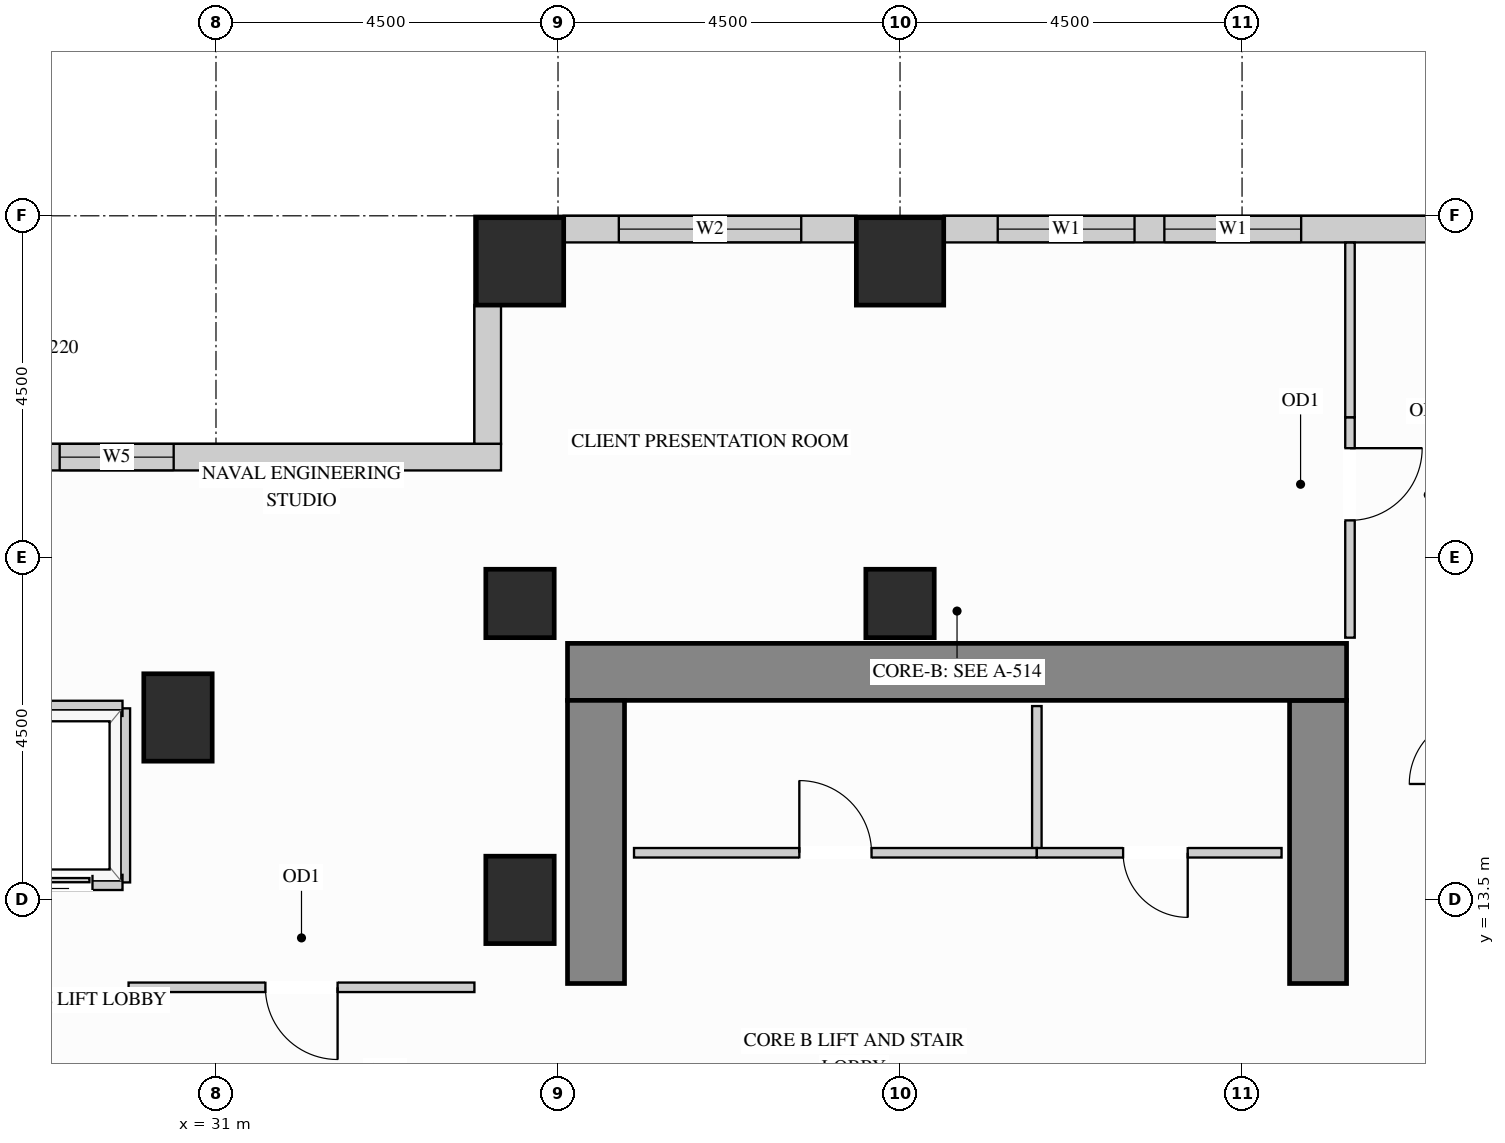
"""IFC4 building model, lengths in metres.
Left out: names, types, materials, properties, quantities, classifications, styles, units other than length and angle.
Written with IfcOpenShell. Run it as: python <this file> out.ifc"""

import sys

from ifc_helpers import new_model, si_unit, direction, frame, frame_2d, origin, origin_2d, place, context, subcontext, project, spatial, rectangle, extrude, source, transform, mapped, element, fill, save


model = new_model("IFC4")
c1 = context("Model", 3, precision=1e-05, world=origin(), true_north=direction((0.0, 1.0)))
c2 = subcontext(c1, "Body", "Model", "MODEL_VIEW")
j1 = project(units=[si_unit("LENGTHUNIT", "METRE"), si_unit("PLANEANGLEUNIT", "RADIAN")], contexts=[c1])
p1 = place(None, origin())
s1 = spatial("IfcSite", under=j1, at=p1, CompositionType="ELEMENT")
p2 = place(p1, origin())
s2 = spatial("IfcBuilding", under=s1, at=p2, CompositionType="ELEMENT")
p3 = place(p2, frame((0.0, 0.0, 109.8)))
s3 = spatial("IfcBuildingStorey", under=s2, at=p3, CompositionType="ELEMENT", Elevation=109.8)
m1 = source(origin(), c2, "Body", "SweptSolid", [
    extrude(rectangle(XDim=0.9, YDim=0.9, at=origin_2d()), origin(), (0.0, 0.0, 1.0), 3.38),
])
for number, where, z_axis, x_axis in (
    (1, (35.0, 17.4, 0.0), (0.0, 0.0, 1.0), (1.0, 0.0, 0.0)),
    (2, (40.0, 17.4, 0.0), (0.0, 0.0, 1.0), (1.0, 0.0, 0.0)),
):
    element("IfcColumn", number, at=place(p3, frame(where, z_axis=z_axis, x_axis=x_axis)), inside=s3, PredefinedType="COLUMN", context=c2, shape_type="MappedRepresentation", body=[
        mapped(m1, transform((0.0, 0.0, 0.0), x_axis=(1.0, 0.0, 0.0), y_axis=(0.0, 1.0, 0.0), z_axis=(0.0, 0.0, 1.0))),
    ])
m2 = source(origin(), c2, "Body", "SweptSolid", [
    extrude(rectangle(XDim=0.9, YDim=1.15, at=origin_2d()), origin(), (0.0, 0.0, 1.0), 3.38),
])
for number, where, z_axis, x_axis in (
    (3, (35.0, 13.5, 0.0), (0.0, 0.0, 1.0), (1.0, 0.0, 0.0)),
    (4, (30.5, 15.9, 0.0), (0.0, 0.0, 1.0), (1.0, 0.0, 0.0)),
):
    element("IfcColumn", number, at=place(p3, frame(where, z_axis=z_axis, x_axis=x_axis)), inside=s3, PredefinedType="COLUMN", context=c2, shape_type="MappedRepresentation", body=[
        mapped(m2, transform((0.0, 0.0, 0.0), x_axis=(1.0, 0.0, 0.0), y_axis=(0.0, 1.0, 0.0), z_axis=(0.0, 0.0, 1.0))),
    ])
m3 = source(origin(), c2, "Body", "SweptSolid", [
    extrude(rectangle(XDim=1.15, YDim=1.15, at=origin_2d()), origin(), (0.0, 0.0, 1.0), 3.38),
])
for number, where, z_axis, x_axis in (
    (5, (35.0, 21.9, 0.0), (0.0, 0.0, 1.0), (1.0, 0.0, 0.0)),
    (6, (40.0, 21.9, 0.0), (0.0, 0.0, 1.0), (1.0, 0.0, 0.0)),
):
    element("IfcColumn", number, at=place(p3, frame(where, z_axis=z_axis, x_axis=x_axis)), inside=s3, PredefinedType="COLUMN", context=c2, shape_type="MappedRepresentation", body=[
        mapped(m3, transform((0.0, 0.0, 0.0), x_axis=(1.0, 0.0, 0.0), y_axis=(0.0, 1.0, 0.0), z_axis=(0.0, 0.0, 1.0))),
    ])
m4 = source(origin(), c2, "Body", "SweptSolid", [
    extrude(rectangle(XDim=3.725, YDim=0.75, at=frame_2d((1.863, 0.0))), origin(), (0.0, 0.0, 1.0), 3.38),
])
p4 = place(p3, frame((45.5, 12.4, 0.0), z_axis=(0.0, 0.0, 1.0), x_axis=(0.0, 1.0, 0.0)))
e7 = element("IfcWall", 7, at=p4, inside=s3, PredefinedType="SHEAR", context=c2, shape_type="MappedRepresentation", body=[
    mapped(m4, transform((0.0, 0.0, 0.0), x_axis=(1.0, 0.0, 0.0), y_axis=(0.0, 1.0, 0.0), z_axis=(0.0, 0.0, 1.0))),
])
m5 = source(origin(), c2, "Body", "SweptSolid", [
    extrude(rectangle(XDim=10.25, YDim=0.75, at=frame_2d((5.125, 0.0))), origin(), (0.0, 0.0, 1.0), 3.38),
])
p5 = place(p3, frame((35.625, 16.5, 0.0), z_axis=(0.0, 0.0, 1.0), x_axis=(1.0, 0.0, 0.0)))
e8 = element("IfcWall", 8, at=p5, inside=s3, PredefinedType="SHEAR", context=c2, shape_type="MappedRepresentation", body=[
    mapped(m5, transform((0.0, 0.0, 0.0), x_axis=(1.0, 0.0, 0.0), y_axis=(0.0, 1.0, 0.0), z_axis=(0.0, 0.0, 1.0))),
])
p6 = place(p3, frame((36.0, 12.4, 0.0), z_axis=(0.0, 0.0, 1.0), x_axis=(0.0, 1.0, 0.0)))
e9 = element("IfcWall", 9, at=p6, inside=s3, PredefinedType="SHEAR", context=c2, shape_type="MappedRepresentation", body=[
    mapped(m4, transform((0.0, 0.0, 0.0), x_axis=(1.0, 0.0, 0.0), y_axis=(0.0, 1.0, 0.0), z_axis=(0.0, 0.0, 1.0))),
])
p7 = place(p3, frame((47.027, 22.325, 0.0), z_axis=(0.0, 0.0, 1.0), x_axis=(-1.0, 0.0, 0.0)))
e10 = element("IfcWall", 10, at=p7, inside=s3, PredefinedType="SOLIDWALL", context=c2, shape_type="SweptSolid", body=[
    extrude(rectangle(XDim=6.454, YDim=0.35, at=frame_2d((3.227, 0.0))), origin(), (0.0, 0.0, 1.0), 3.365),
])
p8 = place(p7, frame((1.749, 0.0, 0.78)))
e11 = element("IfcOpeningElement", 11, at=p8, cuts=e10, PredefinedType="OPENING", context=c2, shape_type="SweptSolid", body=[
    extrude(rectangle(XDim=1.8, YDim=2.1, at=frame_2d((0.9, 1.05))), frame((0.0, 0.185, 0.0), z_axis=(0.0, -1.0, 0.0), x_axis=(1.0, 0.0, 0.0)), (0.0, 0.0, 1.0), 0.37),
])
p9 = place(p7, frame((3.942, 0.0, 0.78)))
e12 = element("IfcOpeningElement", 12, at=p9, cuts=e10, PredefinedType="OPENING", context=c2, shape_type="SweptSolid", body=[
    extrude(rectangle(XDim=1.8, YDim=2.1, at=frame_2d((0.9, 1.05))), frame((0.0, 0.185, 0.0), z_axis=(0.0, -1.0, 0.0), x_axis=(1.0, 0.0, 0.0)), (0.0, 0.0, 1.0), 0.37),
])
p10 = place(p3, frame((39.427, 22.325, 0.0), z_axis=(0.0, 0.0, 1.0), x_axis=(-1.0, 0.0, 0.0)))
e13 = element("IfcWall", 13, at=p10, inside=s3, PredefinedType="SOLIDWALL", context=c2, shape_type="SweptSolid", body=[
    extrude(rectangle(XDim=3.854, YDim=0.35, at=frame_2d((1.927, 0.0))), origin(), (0.0, 0.0, 1.0), 3.365),
])
p11 = place(p10, frame((0.727, 0.0, 0.78)))
e14 = element("IfcOpeningElement", 14, at=p11, cuts=e13, PredefinedType="OPENING", context=c2, shape_type="SweptSolid", body=[
    extrude(rectangle(XDim=2.4, YDim=2.1, at=frame_2d((1.2, 1.05))), frame((0.0, 0.185, 0.0), z_axis=(0.0, -1.0, 0.0), x_axis=(1.0, 0.0, 0.0)), (0.0, 0.0, 1.0), 0.37),
])
m6 = source(origin(), c2, "Body", "SweptSolid", [
    extrude(rectangle(XDim=1.829, YDim=0.35, at=frame_2d((0.915, 0.0))), origin(), (0.0, 0.0, 1.0), 3.365),
])
p12 = place(p3, frame((34.575, 21.327, 0.0), z_axis=(0.0, 0.0, 1.0), x_axis=(0.0, -1.0, 0.0)))
e15 = element("IfcWall", 15, at=p12, inside=s3, PredefinedType="SOLIDWALL", context=c2, shape_type="MappedRepresentation", body=[
    mapped(m6, transform((0.0, 0.0, 0.0), x_axis=(1.0, 0.0, 0.0), y_axis=(0.0, 1.0, 0.0), z_axis=(0.0, 0.0, 1.0))),
])
p13 = place(p3, frame((34.75, 19.325, 0.0), z_axis=(0.0, 0.0, 1.0), x_axis=(-1.0, 0.0, 0.0)))
e16 = element("IfcWall", 16, at=p13, inside=s3, PredefinedType="SOLIDWALL", context=c2, shape_type="SweptSolid", body=[
    extrude(rectangle(XDim=15.6, YDim=0.35, at=frame_2d((7.8, 0.0))), origin(), (0.0, 0.0, 1.0), 3.365),
])
p14 = place(p13, frame((4.307, 0.0, 0.78)))
e17 = element("IfcOpeningElement", 17, at=p14, cuts=e16, PredefinedType="OPENING", context=c2, shape_type="SweptSolid", body=[
    extrude(rectangle(XDim=1.5, YDim=2.0, at=frame_2d((0.75, 1.0))), frame((0.0, 0.185, 0.0), z_axis=(0.0, -1.0, 0.0), x_axis=(1.0, 0.0, 0.0)), (0.0, 0.0, 1.0), 0.37),
])
p15 = place(p13, frame((9.793, 0.0, 0.78)))
e18 = element("IfcOpeningElement", 18, at=p15, cuts=e16, PredefinedType="OPENING", context=c2, shape_type="SweptSolid", body=[
    extrude(rectangle(XDim=1.5, YDim=2.0, at=frame_2d((0.75, 1.0))), frame((0.0, 0.185, 0.0), z_axis=(0.0, -1.0, 0.0), x_axis=(1.0, 0.0, 0.0)), (0.0, 0.0, 1.0), 0.37),
])
m7 = source(origin(), c2, "Body", "SweptSolid", [
    extrude(rectangle(XDim=1.93, YDim=0.125, at=frame_2d((0.965, 0.0))), origin(), (0.0, 0.0, 1.0), 3.365),
])
p16 = place(p3, frame((41.8, 14.12, 0.0), z_axis=(0.0, 0.0, 1.0), x_axis=(0.0, 1.0, 0.0)))
e19 = element("IfcWall", 19, at=p16, inside=s3, PredefinedType="PARTITIONING", context=c2, shape_type="MappedRepresentation", body=[
    mapped(m7, transform((0.0, 0.0, 0.0), x_axis=(1.0, 0.0, 0.0), y_axis=(0.0, 1.0, 0.0), z_axis=(0.0, 0.0, 1.0))),
])
p17 = place(p3, frame((36.5, 14.12, 0.0), z_axis=(0.0, 0.0, 1.0), x_axis=(1.0, 0.0, 0.0)))
e20 = element("IfcWall", 20, at=p17, inside=s3, PredefinedType="PARTITIONING", context=c2, shape_type="SweptSolid", body=[
    extrude(rectangle(XDim=5.3, YDim=0.125, at=frame_2d((2.65, 0.0))), origin(), (0.0, 0.0, 1.0), 3.365),
])
p18 = place(p17, frame((2.175, 0.0, 0.0)))
e21 = element("IfcOpeningElement", 21, at=p18, cuts=e20, PredefinedType="OPENING", context=c2, shape_type="SweptSolid", body=[
    extrude(rectangle(XDim=0.95, YDim=2.15, at=frame_2d((0.475, 1.075))), frame((0.0, 0.073, 0.0), z_axis=(0.0, -1.0, 0.0), x_axis=(1.0, 0.0, 0.0)), (0.0, 0.0, 1.0), 0.145),
])
p19 = place(p3, frame((41.8, 14.12, 0.0), z_axis=(0.0, 0.0, 1.0), x_axis=(1.0, 0.0, 0.0)))
e22 = element("IfcWall", 22, at=p19, inside=s3, PredefinedType="PARTITIONING", context=c2, shape_type="SweptSolid", body=[
    extrude(rectangle(XDim=3.22, YDim=0.125, at=frame_2d((1.61, 0.0))), origin(), (0.0, 0.0, 1.0), 3.365),
])
p20 = place(p19, frame((1.135, 0.0, 0.0)))
e23 = element("IfcOpeningElement", 23, at=p20, cuts=e22, PredefinedType="OPENING", context=c2, shape_type="SweptSolid", body=[
    extrude(rectangle(XDim=0.85, YDim=2.1, at=frame_2d((0.425, 1.05))), frame((0.0, 0.073, 0.0), z_axis=(0.0, -1.0, 0.0), x_axis=(1.0, 0.0, 0.0)), (0.0, 0.0, 1.0), 0.145),
])
p21 = place(p3, frame((45.92, 16.95, 0.0), z_axis=(0.0, 0.0, 1.0), x_axis=(0.0, 1.0, 0.0)))
e24 = element("IfcWall", 24, at=p21, inside=s3, PredefinedType="PARTITIONING", context=c2, shape_type="SweptSolid", body=[
    extrude(rectangle(XDim=2.9, YDim=0.125, at=frame_2d((1.45, 0.0))), origin(), (0.0, 0.0, 1.0), 3.365),
])
p22 = place(p21, frame((1.543, 0.0, 0.0)))
e25 = element("IfcOpeningElement", 25, at=p22, cuts=e24, PredefinedType="OPENING", context=c2, shape_type="SweptSolid", body=[
    extrude(rectangle(XDim=0.95, YDim=2.15, at=frame_2d((0.475, 1.075))), frame((0.0, 0.073, 0.0), z_axis=(0.0, -1.0, 0.0), x_axis=(1.0, 0.0, 0.0)), (0.0, 0.0, 1.0), 0.145),
])
m8 = source(origin(), c2, "Body", "SweptSolid", [
    extrude(rectangle(XDim=2.298, YDim=0.125, at=frame_2d((1.149, 0.0))), origin(), (0.0, 0.0, 1.0), 3.365),
])
p23 = place(p3, frame((45.92, 19.85, 0.0), z_axis=(0.0, 0.0, 1.0), x_axis=(0.0, 1.0, 0.0)))
e26 = element("IfcWall", 26, at=p23, inside=s3, PredefinedType="PARTITIONING", context=c2, shape_type="MappedRepresentation", body=[
    mapped(m8, transform((0.0, 0.0, 0.0), x_axis=(1.0, 0.0, 0.0), y_axis=(0.0, 1.0, 0.0), z_axis=(0.0, 0.0, 1.0))),
])
p24 = place(p3, frame((29.85, 12.35, 0.0), z_axis=(0.0, 0.0, 1.0), x_axis=(1.0, 0.0, 0.0)))
e27 = element("IfcWall", 27, at=p24, inside=s3, PredefinedType="PARTITIONING", context=c2, shape_type="SweptSolid", body=[
    extrude(rectangle(XDim=4.55, YDim=0.125, at=frame_2d((2.275, 0.0))), origin(), (0.0, 0.0, 1.0), 3.365),
])
p25 = place(p24, frame((1.8, 0.0, 0.0)))
e28 = element("IfcOpeningElement", 28, at=p25, cuts=e27, PredefinedType="OPENING", context=c2, shape_type="SweptSolid", body=[
    extrude(rectangle(XDim=0.95, YDim=2.15, at=frame_2d((0.475, 1.075))), frame((0.0, 0.073, 0.0), z_axis=(0.0, -1.0, 0.0), x_axis=(1.0, 0.0, 0.0)), (0.0, 0.0, 1.0), 0.145),
])
m9 = source(origin(), c2, "Body", "SweptSolid", [
    extrude(rectangle(XDim=2.29, YDim=0.2, at=frame_2d((1.145, 0.0))), origin(), (0.0, 0.0, 1.0), 3.365),
])
p26 = place(p3, frame((29.77, 13.73, 0.0), z_axis=(0.0, 0.0, 1.0), x_axis=(0.0, 1.0, 0.0)))
e29 = element("IfcWall", 29, at=p26, inside=s3, PredefinedType="PARTITIONING", context=c2, shape_type="MappedRepresentation", body=[
    mapped(m9, transform((0.0, 0.0, 0.0), x_axis=(1.0, 0.0, 0.0), y_axis=(0.0, 1.0, 0.0), z_axis=(0.0, 0.0, 1.0))),
])
m10 = source(origin(), c2, "Body", "SweptSolid", [
    extrude(rectangle(XDim=1.89, YDim=0.2, at=frame_2d((0.945, 0.0))), origin(), (0.0, 0.0, 1.0), 2.677),
])
p27 = place(p3, frame((27.88, 16.02, 0.0), z_axis=(0.0, 0.0, 1.0), x_axis=(1.0, 0.0, 0.0)))
e30 = element("IfcWall", 30, at=p27, inside=s3, PredefinedType="PARTITIONING", context=c2, shape_type="MappedRepresentation", body=[
    mapped(m10, transform((0.0, 0.0, 0.0), x_axis=(1.0, 0.0, 0.0), y_axis=(0.0, 1.0, 0.0), z_axis=(0.0, 0.0, 1.0))),
])
p28 = place(p3, frame((27.88, 13.73, 0.0), z_axis=(0.0, 0.0, 1.0), x_axis=(1.0, 0.0, 0.0)))
e31 = element("IfcWall", 31, at=p28, inside=s3, PredefinedType="PARTITIONING", context=c2, shape_type="SweptSolid", body=[
    extrude(rectangle(XDim=1.89, YDim=0.2, at=frame_2d((0.945, 0.0))), origin(), (0.0, 0.0, 1.0), 2.446),
])
p29 = place(p28, frame((0.395, 0.0, 0.0)))
e32 = element("IfcOpeningElement", 32, at=p29, cuts=e31, PredefinedType="OPENING", context=c2, shape_type="SweptSolid", body=[
    extrude(rectangle(XDim=1.1, YDim=2.2, at=frame_2d((0.55, 1.1))), frame((0.0, 0.11, 0.0), z_axis=(0.0, -1.0, 0.0), x_axis=(1.0, 0.0, 0.0)), (0.0, 0.0, 1.0), 0.22),
])
m11 = source(origin(), c2, "Body", "SweptSolid", [
    extrude(rectangle(XDim=1.1, YDim=2.2, at=frame_2d((0.55, 1.1))), frame((0.0, 0.025, 0.0), z_axis=(0.0, -1.0, 0.0), x_axis=(1.0, 0.0, 0.0)), (0.0, 0.0, 1.0), 0.05),
])
p30 = place(p29, origin())
e33 = element("IfcDoor", 33, at=p30, inside=s3, OperationType="SLIDING_TO_LEFT", PredefinedType="DOOR", context=c2, shape_type="MappedRepresentation", body=[
    mapped(m11, transform((0.0, 0.0, 0.0), x_axis=(1.0, 0.0, 0.0), y_axis=(0.0, 1.0, 0.0), z_axis=(0.0, 0.0, 1.0))),
])
fill(e32, e33)
m12 = source(origin(), c2, "Body", "SweptSolid", [
    extrude(rectangle(XDim=0.95, YDim=2.15, at=frame_2d((0.475, 1.075))), frame((0.0, 0.025, 0.0), z_axis=(0.0, -1.0, 0.0), x_axis=(1.0, 0.0, 0.0)), (0.0, 0.0, 1.0), 0.05),
])
p31 = place(p18, origin())
e34 = element("IfcDoor", 34, at=p31, inside=s3, OperationType="SINGLE_SWING_LEFT", PredefinedType="DOOR", context=c2, shape_type="MappedRepresentation", body=[
    mapped(m12, transform((0.0, 0.0, 0.0), x_axis=(1.0, 0.0, 0.0), y_axis=(0.0, 1.0, 0.0), z_axis=(0.0, 0.0, 1.0))),
])
fill(e21, e34)
p32 = place(p22, origin())
e35 = element("IfcDoor", 35, at=p32, inside=s3, OperationType="SINGLE_SWING_RIGHT", PredefinedType="DOOR", context=c2, shape_type="MappedRepresentation", body=[
    mapped(m12, transform((0.0, 0.0, 0.0), x_axis=(1.0, 0.0, 0.0), y_axis=(0.0, 1.0, 0.0), z_axis=(0.0, 0.0, 1.0))),
])
fill(e25, e35)
p33 = place(p25, origin())
e36 = element("IfcDoor", 36, at=p33, inside=s3, OperationType="SINGLE_SWING_RIGHT", PredefinedType="DOOR", context=c2, shape_type="MappedRepresentation", body=[
    mapped(m12, transform((0.0, 0.0, 0.0), x_axis=(1.0, 0.0, 0.0), y_axis=(0.0, 1.0, 0.0), z_axis=(0.0, 0.0, 1.0))),
])
fill(e28, e36)
m13 = source(origin(), c2, "Body", "SweptSolid", [
    extrude(rectangle(XDim=0.85, YDim=2.1, at=frame_2d((0.425, 1.05))), frame((0.0, 0.025, 0.0), z_axis=(0.0, -1.0, 0.0), x_axis=(1.0, 0.0, 0.0)), (0.0, 0.0, 1.0), 0.05),
])
p34 = place(p20, origin())
e37 = element("IfcDoor", 37, at=p34, inside=s3, OperationType="SINGLE_SWING_RIGHT", PredefinedType="DOOR", context=c2, shape_type="MappedRepresentation", body=[
    mapped(m13, transform((0.0, 0.0, 0.0), x_axis=(1.0, 0.0, 0.0), y_axis=(0.0, 1.0, 0.0), z_axis=(0.0, 0.0, 1.0))),
])
fill(e23, e37)
m14 = source(origin(), c2, "Body", "SweptSolid", [
    extrude(rectangle(XDim=1.8, YDim=2.1, at=frame_2d((0.9, 1.05))), frame((0.0, 0.03, 0.0), z_axis=(0.0, -1.0, 0.0), x_axis=(1.0, 0.0, 0.0)), (0.0, 0.0, 1.0), 0.06),
])
p35 = place(p8, origin())
e38 = element("IfcWindow", 38, at=p35, inside=s3, PartitioningType="SINGLE_PANEL", PredefinedType="WINDOW", context=c2, shape_type="MappedRepresentation", body=[
    mapped(m14, transform((0.0, 0.0, 0.0), x_axis=(1.0, 0.0, 0.0), y_axis=(0.0, 1.0, 0.0), z_axis=(0.0, 0.0, 1.0))),
])
fill(e11, e38)
p36 = place(p9, origin())
e39 = element("IfcWindow", 39, at=p36, inside=s3, PartitioningType="SINGLE_PANEL", PredefinedType="WINDOW", context=c2, shape_type="MappedRepresentation", body=[
    mapped(m14, transform((0.0, 0.0, 0.0), x_axis=(1.0, 0.0, 0.0), y_axis=(0.0, 1.0, 0.0), z_axis=(0.0, 0.0, 1.0))),
])
fill(e12, e39)
m15 = source(origin(), c2, "Body", "SweptSolid", [
    extrude(rectangle(XDim=2.4, YDim=2.1, at=frame_2d((1.2, 1.05))), frame((0.0, 0.03, 0.0), z_axis=(0.0, -1.0, 0.0), x_axis=(1.0, 0.0, 0.0)), (0.0, 0.0, 1.0), 0.06),
])
p37 = place(p11, origin())
e40 = element("IfcWindow", 40, at=p37, inside=s3, PartitioningType="SINGLE_PANEL", PredefinedType="WINDOW", context=c2, shape_type="MappedRepresentation", body=[
    mapped(m15, transform((0.0, 0.0, 0.0), x_axis=(1.0, 0.0, 0.0), y_axis=(0.0, 1.0, 0.0), z_axis=(0.0, 0.0, 1.0))),
])
fill(e14, e40)
m16 = source(origin(), c2, "Body", "SweptSolid", [
    extrude(rectangle(XDim=1.5, YDim=2.0, at=frame_2d((0.75, 1.0))), frame((0.0, 0.03, 0.0), z_axis=(0.0, -1.0, 0.0), x_axis=(1.0, 0.0, 0.0)), (0.0, 0.0, 1.0), 0.06),
])
p38 = place(p14, origin())
e41 = element("IfcWindow", 41, at=p38, inside=s3, PartitioningType="SINGLE_PANEL", PredefinedType="WINDOW", context=c2, shape_type="MappedRepresentation", body=[
    mapped(m16, transform((0.0, 0.0, 0.0), x_axis=(1.0, 0.0, 0.0), y_axis=(0.0, 1.0, 0.0), z_axis=(0.0, 0.0, 1.0))),
])
fill(e17, e41)
save(model, sys.argv[1])
